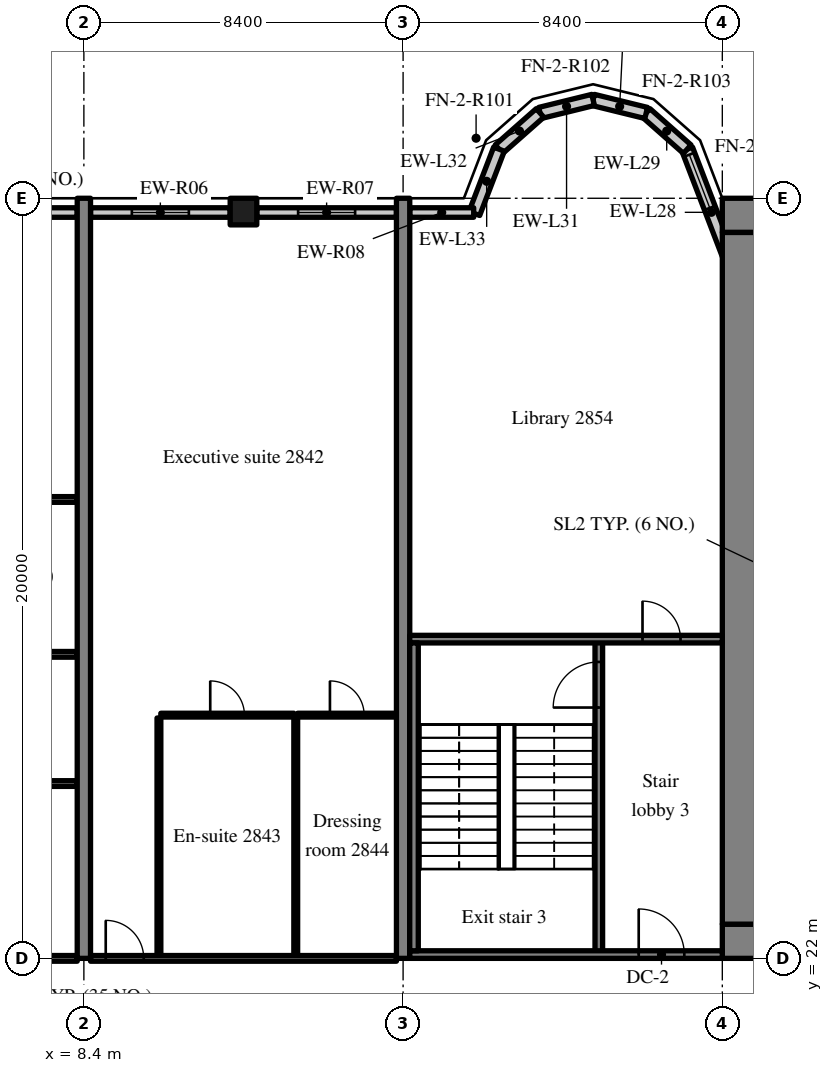
"""IFC4 building model, lengths in metres.
Left out: names, types, materials, properties, quantities, classifications, styles, units other than length and angle.
Written with IfcOpenShell. Run it as: python <this file> out.ifc"""

import sys

from ifc_helpers import new_model, si_unit, direction, frame, frame_2d, origin, origin_2d, place, context, subcontext, project, spatial, rectangle, extrude, source, transform, mapped, element, fill, save


model = new_model("IFC4")
c1 = context("Model", 3, precision=1e-05, world=origin(), true_north=direction((0.0, 1.0)))
c2 = subcontext(c1, "Body", "Model", "MODEL_VIEW")
j1 = project(units=[si_unit("LENGTHUNIT", "METRE"), si_unit("PLANEANGLEUNIT", "RADIAN")], contexts=[c1])
p1 = place(None, origin())
s1 = spatial("IfcSite", under=j1, at=p1, CompositionType="ELEMENT")
p2 = place(p1, origin())
s2 = spatial("IfcBuilding", under=s1, at=p2, CompositionType="ELEMENT")
p3 = place(p2, frame((0.0, 0.0, 118.0)))
s3 = spatial("IfcBuildingStorey", under=s2, at=p3, CompositionType="ELEMENT", Elevation=118.0)
m1 = source(origin(), c2, "Body", "SweptSolid", [
    extrude(rectangle(XDim=50.4, YDim=0.9, at=frame_2d((25.2, 0.0))), origin(), (0.0, 0.0, 1.0), 3.52),
])
p4 = place(p3, frame((25.2, 22.45, 0.0), z_axis=(0.0, 0.0, 1.0), x_axis=(1.0, 0.0, 0.0)))
e1 = element("IfcWall", 1, at=p4, inside=s3, PredefinedType="SHEAR", context=c2, shape_type="MappedRepresentation", body=[
    mapped(m1, transform((0.0, 0.0, 0.0), scale=1.0)),
])
m2 = source(origin(), c2, "Body", "SweptSolid", [
    extrude(rectangle(XDim=1.8, YDim=2.1, at=frame_2d((0.9, 1.05))), frame((0.0, 0.46, 0.0), z_axis=(0.0, -1.0, 0.0), x_axis=(1.0, 0.0, 0.0)), (0.0, 0.0, 1.0), 0.92),
])
p5 = place(p4, frame((15.9, 0.0, 0.0)))
e2 = element("IfcOpeningElement", 2, at=p5, cuts=e1, PredefinedType="OPENING", context=c2, shape_type="MappedRepresentation", body=[
    mapped(m2, transform((0.0, 0.0, 0.0), scale=1.0)),
])
m3 = source(origin(), c2, "Body", "SweptSolid", [
    extrude(rectangle(XDim=1.2, YDim=2.1, at=frame_2d((0.6, 1.05))), frame((0.0, 0.46, 0.0), z_axis=(0.0, -1.0, 0.0), x_axis=(1.0, 0.0, 0.0)), (0.0, 0.0, 1.0), 0.92),
])
p6 = place(p4, frame((26.975, 0.0, 0.0)))
e3 = element("IfcOpeningElement", 3, at=p6, cuts=e1, PredefinedType="OPENING", context=c2, shape_type="MappedRepresentation", body=[
    mapped(m3, transform((0.0, 0.0, 0.0), scale=1.0)),
])
m4 = source(origin(), c2, "Body", "SweptSolid", [
    extrude(rectangle(XDim=0.9, YDim=2.1, at=frame_2d((0.45, 1.05))), frame((0.0, 0.46, 0.0), z_axis=(0.0, -1.0, 0.0), x_axis=(1.0, 0.0, 0.0)), (0.0, 0.0, 1.0), 0.92),
])
p7 = place(p4, frame((33.75, 0.0, 0.0)))
e4 = element("IfcOpeningElement", 4, at=p7, cuts=e1, PredefinedType="OPENING", context=c2, shape_type="MappedRepresentation", body=[
    mapped(m4, transform((0.0, 0.0, 0.0), scale=1.0)),
])
p8 = place(p4, frame((30.75, 0.0, 0.0)))
e5 = element("IfcOpeningElement", 5, at=p8, cuts=e1, PredefinedType="OPENING", context=c2, shape_type="MappedRepresentation", body=[
    mapped(m4, transform((0.0, 0.0, 0.0), scale=1.0)),
])
p9 = place(p4, frame((39.788, 0.0, 0.0)))
e6 = element("IfcOpeningElement", 6, at=p9, cuts=e1, PredefinedType="OPENING", context=c2, shape_type="MappedRepresentation", body=[
    mapped(m4, transform((0.0, 0.0, 0.0), scale=1.0)),
])
p10 = place(p4, frame((36.762, 0.0, 0.0)))
e7 = element("IfcOpeningElement", 7, at=p10, cuts=e1, PredefinedType="OPENING", context=c2, shape_type="MappedRepresentation", body=[
    mapped(m4, transform((0.0, 0.0, 0.0), scale=1.0)),
])
p11 = place(p4, frame((6.45, 0.0, 0.0)))
e8 = element("IfcOpeningElement", 8, at=p11, cuts=e1, PredefinedType="OPENING", context=c2, shape_type="MappedRepresentation", body=[
    mapped(m3, transform((0.0, 0.0, 0.0), scale=1.0)),
])
p12 = place(p4, frame((47.775, 0.0, 0.0)))
e9 = element("IfcOpeningElement", 9, at=p12, cuts=e1, PredefinedType="OPENING", context=c2, shape_type="MappedRepresentation", body=[
    mapped(m3, transform((0.0, 0.0, 0.0), scale=1.0)),
])
p13 = place(p3, frame((25.2, 41.55, 0.0), z_axis=(0.0, 0.0, 1.0), x_axis=(1.0, 0.0, 0.0)))
e10 = element("IfcWall", 10, at=p13, inside=s3, PredefinedType="SHEAR", context=c2, shape_type="MappedRepresentation", body=[
    mapped(m1, transform((0.0, 0.0, 0.0), scale=1.0)),
])
m5 = source(origin(), c2, "Body", "SweptSolid", [
    extrude(rectangle(XDim=18.2, YDim=0.9, at=frame_2d((9.1, 0.0))), origin(), (0.0, 0.0, 1.0), 3.52),
])
p14 = place(p3, frame((25.65, 22.9, 0.0), z_axis=(0.0, 0.0, 1.0), x_axis=(0.0, 1.0, 0.0)))
e11 = element("IfcWall", 11, at=p14, inside=s3, PredefinedType="SHEAR", context=c2, shape_type="MappedRepresentation", body=[
    mapped(m5, transform((0.0, 0.0, 0.0), scale=1.0)),
])
m6 = source(origin(), c2, "Body", "SweptSolid", [
    extrude(rectangle(XDim=20.0, YDim=0.35, at=frame_2d((10.0, 0.0))), origin(), (0.0, 0.0, 1.0), 3.52),
])
for number, where, z_axis, x_axis in (
    (12, (8.4, 22.0, 0.0), (0.0, 0.0, 1.0), (0.0, 1.0, 0.0)),
    (13, (16.8, 22.0, 0.0), (0.0, 0.0, 1.0), (0.0, 1.0, 0.0)),
):
    element("IfcWall", number, at=place(p3, frame(where, z_axis=z_axis, x_axis=x_axis)), inside=s3, PredefinedType="SHEAR", context=c2, shape_type="MappedRepresentation", body=[
        mapped(m6, transform((0.0, 0.0, 0.0), scale=1.0)),
    ])
m7 = source(origin(), c2, "Body", "SweptSolid", [
    extrude(rectangle(XDim=0.7, YDim=0.7, at=origin_2d()), origin(), (0.0, 0.0, 1.0), 3.52),
])
p15 = place(p3, frame((12.6, 41.65, 0.0), z_axis=(0.0, 0.0, 1.0), x_axis=(1.0, 0.0, 0.0)))
e14 = element("IfcColumn", 14, at=p15, inside=s3, PredefinedType="COLUMN", context=c2, shape_type="MappedRepresentation", body=[
    mapped(m7, transform((0.0, 0.0, 0.0), scale=1.0)),
])
m8 = source(origin(), c2, "Body", "SweptSolid", [
    extrude(rectangle(XDim=3.559, YDim=0.3, at=frame_2d((1.78, 0.0))), origin(), (0.0, 0.0, 1.0), 3.52),
])
p16 = place(p3, frame((25.55, 39.969, 0.0), z_axis=(0.0, 0.0, 1.0), x_axis=(-0.35779745313, 0.933799219604, 0.0)))
e15 = element("IfcWall", 15, at=p16, inside=s3, PredefinedType="SOLIDWALL", context=c2, shape_type="MappedRepresentation", body=[
    mapped(m8, transform((0.0, 0.0, 0.0), scale=1.0)),
])
m9 = source(origin(), c2, "Body", "SweptSolid", [
    extrude(rectangle(XDim=1.5, YDim=2.0, at=frame_2d((0.75, 1.0))), frame((0.0, 0.16, 0.0), z_axis=(0.0, -1.0, 0.0), x_axis=(1.0, 0.0, 0.0)), (0.0, 0.0, 1.0), 0.32),
])
p17 = place(p16, frame((1.903, 0.0, 0.9)))
e16 = element("IfcOpeningElement", 16, at=p17, cuts=e15, PredefinedType="OPENING", context=c2, shape_type="MappedRepresentation", body=[
    mapped(m9, transform((0.0, 0.0, 0.0), scale=1.0)),
])
m10 = source(origin(), c2, "Body", "SweptSolid", [
    extrude(rectangle(XDim=1.44, YDim=0.3, at=frame_2d((0.72, 0.0))), origin(), (0.0, 0.0, 1.0), 3.52),
])
p18 = place(p3, frame((24.277, 43.292, 0.0), z_axis=(0.0, 0.0, 1.0), x_axis=(-0.749649827867, 0.661834673902, 0.0)))
e17 = element("IfcWall", 17, at=p18, inside=s3, PredefinedType="SOLIDWALL", context=c2, shape_type="MappedRepresentation", body=[
    mapped(m10, transform((0.0, 0.0, 0.0), scale=1.0)),
])
m11 = source(origin(), c2, "Body", "SweptSolid", [
    extrude(rectangle(XDim=1.438, YDim=0.3, at=frame_2d((0.719, 0.0))), origin(), (0.0, 0.0, 1.0), 3.52),
])
p19 = place(p3, frame((23.197, 44.245, 0.0), z_axis=(0.0, 0.0, 1.0), x_axis=(-0.971152283879, 0.238460146601, 0.0)))
e18 = element("IfcWall", 18, at=p19, inside=s3, PredefinedType="SOLIDWALL", context=c2, shape_type="MappedRepresentation", body=[
    mapped(m11, transform((0.0, 0.0, 0.0), scale=1.0)),
])
m12 = source(origin(), c2, "Body", "SweptSolid", [
    extrude(rectangle(XDim=1.439, YDim=0.3, at=frame_2d((0.719, 0.0))), origin(), (0.0, 0.0, 1.0), 3.52),
])
p20 = place(p3, frame((21.8, 44.588, 0.0), z_axis=(0.0, 0.0, 1.0), x_axis=(-0.971161932466, -0.238420848351, 0.0)))
e19 = element("IfcWall", 19, at=p20, inside=s3, PredefinedType="SOLIDWALL", context=c2, shape_type="MappedRepresentation", body=[
    mapped(m12, transform((0.0, 0.0, 0.0), scale=1.0)),
])
m13 = source(origin(), c2, "Body", "SweptSolid", [
    extrude(rectangle(XDim=1.44, YDim=0.3, at=frame_2d((0.72, 0.0))), origin(), (0.0, 0.0, 1.0), 3.52),
])
p21 = place(p3, frame((20.403, 44.245, 0.0), z_axis=(0.0, 0.0, 1.0), x_axis=(-0.74957555648, -0.661918790432, 0.0)))
e20 = element("IfcWall", 20, at=p21, inside=s3, PredefinedType="SOLIDWALL", context=c2, shape_type="MappedRepresentation", body=[
    mapped(m13, transform((0.0, 0.0, 0.0), scale=1.0)),
])
m14 = source(origin(), c2, "Body", "SweptSolid", [
    extrude(rectangle(XDim=1.812, YDim=0.3, at=frame_2d((0.906, 0.0))), origin(), (0.0, 0.0, 1.0), 3.52),
])
p22 = place(p3, frame((19.323, 43.292, 0.0), z_axis=(0.0, 0.0, 1.0), x_axis=(-0.357877270961, -0.93376863244, 0.0)))
e21 = element("IfcWall", 21, at=p22, inside=s3, PredefinedType="SOLIDWALL", context=c2, shape_type="MappedRepresentation", body=[
    mapped(m14, transform((0.0, 0.0, 0.0), scale=1.0)),
])
m15 = source(origin(), c2, "Body", "SweptSolid", [
    extrude(rectangle(XDim=4.07, YDim=0.25, at=frame_2d((2.035, 0.0))), origin(), (0.0, 0.0, 1.0), 2.82),
])
p23 = place(p3, frame((8.225, 41.625, 0.0), z_axis=(0.0, 0.0, 1.0), x_axis=(-1.0, 0.0, 0.0)))
e22 = element("IfcWall", 22, at=p23, inside=s3, PredefinedType="SOLIDWALL", context=c2, shape_type="MappedRepresentation", body=[
    mapped(m15, transform((0.0, 0.0, 0.0), scale=1.0)),
])
m16 = source(origin(), c2, "Body", "SweptSolid", [
    extrude(rectangle(XDim=1.5, YDim=1.5, at=frame_2d((0.75, 0.75))), frame((0.0, 0.135, 0.0), z_axis=(0.0, -1.0, 0.0), x_axis=(1.0, 0.0, 0.0)), (0.0, 0.0, 1.0), 0.27),
])
p24 = place(p23, frame((1.285, 0.0, 0.9)))
e23 = element("IfcOpeningElement", 23, at=p24, cuts=e22, PredefinedType="OPENING", context=c2, shape_type="MappedRepresentation", body=[
    mapped(m16, transform((0.0, 0.0, 0.0), scale=1.0)),
])
m17 = source(origin(), c2, "Body", "SweptSolid", [
    extrude(rectangle(XDim=3.675, YDim=0.25, at=frame_2d((1.837, 0.0))), origin(), (0.0, 0.0, 1.0), 2.82),
])
p25 = place(p3, frame((12.25, 41.625, 0.0), z_axis=(0.0, 0.0, 1.0), x_axis=(-1.0, 0.0, 0.0)))
e24 = element("IfcWall", 24, at=p25, inside=s3, PredefinedType="SOLIDWALL", context=c2, shape_type="MappedRepresentation", body=[
    mapped(m17, transform((0.0, 0.0, 0.0), scale=1.0)),
])
p26 = place(p25, frame((1.087, 0.0, 0.9)))
e25 = element("IfcOpeningElement", 25, at=p26, cuts=e24, PredefinedType="OPENING", context=c2, shape_type="MappedRepresentation", body=[
    mapped(m16, transform((0.0, 0.0, 0.0), scale=1.0)),
])
p27 = place(p3, frame((16.625, 41.625, 0.0), z_axis=(0.0, 0.0, 1.0), x_axis=(-1.0, 0.0, 0.0)))
e26 = element("IfcWall", 26, at=p27, inside=s3, PredefinedType="SOLIDWALL", context=c2, shape_type="MappedRepresentation", body=[
    mapped(m17, transform((0.0, 0.0, 0.0), scale=1.0)),
])
p28 = place(p27, frame((1.087, 0.0, 0.9)))
e27 = element("IfcOpeningElement", 27, at=p28, cuts=e26, PredefinedType="OPENING", context=c2, shape_type="MappedRepresentation", body=[
    mapped(m16, transform((0.0, 0.0, 0.0), scale=1.0)),
])
m18 = source(origin(), c2, "Body", "SweptSolid", [
    extrude(rectangle(XDim=1.683, YDim=0.25, at=frame_2d((0.841, 0.0))), origin(), (0.0, 0.0, 1.0), 2.82),
])
p29 = place(p3, frame((18.658, 41.625, 0.0), z_axis=(0.0, 0.0, 1.0), x_axis=(-1.0, 0.0, 0.0)))
e28 = element("IfcWall", 28, at=p29, inside=s3, PredefinedType="SOLIDWALL", context=c2, shape_type="MappedRepresentation", body=[
    mapped(m18, transform((0.0, 0.0, 0.0), scale=1.0)),
])
m19 = source(origin(), c2, "Body", "SweptSolid", [
    extrude(rectangle(XDim=8.3, YDim=0.2, at=frame_2d((4.15, 0.0))), origin(), (0.0, 0.0, 1.0), 3.52),
])
p30 = place(p3, frame((21.95, 22.1, 0.0), z_axis=(0.0, 0.0, 1.0), x_axis=(0.0, 1.0, 0.0)))
e29 = element("IfcWall", 29, at=p30, inside=s3, PredefinedType="SOLIDWALL", context=c2, shape_type="MappedRepresentation", body=[
    mapped(m19, transform((0.0, 0.0, 0.0), scale=1.0)),
])
m20 = source(origin(), c2, "Body", "SweptSolid", [
    extrude(rectangle(XDim=1.2, YDim=2.1, at=frame_2d((0.6, 1.05))), frame((0.0, 0.11, 0.0), z_axis=(0.0, -1.0, 0.0), x_axis=(1.0, 0.0, 0.0)), (0.0, 0.0, 1.0), 0.22),
])
p31 = place(p30, frame((6.5, 0.0, 0.0)))
e30 = element("IfcOpeningElement", 30, at=p31, cuts=e29, PredefinedType="OPENING", context=c2, shape_type="MappedRepresentation", body=[
    mapped(m20, transform((0.0, 0.0, 0.0), scale=1.0)),
])
m21 = source(origin(), c2, "Body", "SweptSolid", [
    extrude(rectangle(XDim=8.225, YDim=0.2, at=frame_2d((4.112, 0.0))), origin(), (0.0, 0.0, 1.0), 3.52),
])
p32 = place(p3, frame((16.975, 22.1, 0.0), z_axis=(0.0, 0.0, 1.0), x_axis=(1.0, 0.0, 0.0)))
e31 = element("IfcWall", 31, at=p32, inside=s3, PredefinedType="SOLIDWALL", context=c2, shape_type="MappedRepresentation", body=[
    mapped(m21, transform((0.0, 0.0, 0.0), scale=1.0)),
])
p33 = place(p32, frame((6.025, 0.0, 0.0)))
e32 = element("IfcOpeningElement", 32, at=p33, cuts=e31, PredefinedType="OPENING", context=c2, shape_type="MappedRepresentation", body=[
    mapped(m20, transform((0.0, 0.0, 0.0), scale=1.0)),
])
p34 = place(p3, frame((16.975, 30.4, 0.0), z_axis=(0.0, 0.0, 1.0), x_axis=(1.0, 0.0, 0.0)))
e33 = element("IfcWall", 33, at=p34, inside=s3, PredefinedType="SOLIDWALL", context=c2, shape_type="MappedRepresentation", body=[
    mapped(m21, transform((0.0, 0.0, 0.0), scale=1.0)),
])
m22 = source(origin(), c2, "Body", "SweptSolid", [
    extrude(rectangle(XDim=1.0, YDim=2.1, at=frame_2d((0.5, 1.05))), frame((0.0, 0.11, 0.0), z_axis=(0.0, -1.0, 0.0), x_axis=(1.0, 0.0, 0.0)), (0.0, 0.0, 1.0), 0.22),
])
p35 = place(p34, frame((6.125, 0.0, 0.0)))
e34 = element("IfcOpeningElement", 34, at=p35, cuts=e33, PredefinedType="OPENING", context=c2, shape_type="MappedRepresentation", body=[
    mapped(m22, transform((0.0, 0.0, 0.0), scale=1.0)),
])
m23 = source(origin(), c2, "Body", "SweptSolid", [
    extrude(rectangle(XDim=8.1, YDim=0.225, at=frame_2d((4.05, 0.0))), origin(), (0.0, 0.0, 1.0), 3.52),
])
p36 = place(p3, frame((17.087, 22.2, 0.0), z_axis=(0.0, 0.0, 1.0), x_axis=(0.0, 1.0, 0.0)))
e35 = element("IfcWall", 35, at=p36, inside=s3, PredefinedType="SOLIDWALL", context=c2, shape_type="MappedRepresentation", body=[
    mapped(m23, transform((0.0, 0.0, 0.0), scale=1.0)),
])
m24 = source(origin(), c2, "Body", "SweptSolid", [
    extrude(rectangle(XDim=5.325, YDim=0.15, at=frame_2d((2.663, 0.0))), origin(), (0.0, 0.0, 1.0), 2.82),
])
p37 = place(p3, frame((2.9, 22.0, 0.0), z_axis=(0.0, 0.0, 1.0), x_axis=(1.0, 0.0, 0.0)))
e36 = element("IfcWall", 36, at=p37, inside=s3, PredefinedType="PARTITIONING", context=c2, shape_type="MappedRepresentation", body=[
    mapped(m24, transform((0.0, 0.0, 0.0), scale=1.0)),
])
m25 = source(origin(), c2, "Body", "SweptSolid", [
    extrude(rectangle(XDim=5.325, YDim=0.15, at=frame_2d((2.663, 0.0))), origin(), (0.0, 0.0, 1.0), 3.52),
])
for number, where, z_axis, x_axis in (
    (37, (2.9, 26.6, 0.0), (0.0, 0.0, 1.0), (1.0, 0.0, 0.0)),
    (38, (2.9, 30.0, 0.0), (0.0, 0.0, 1.0), (1.0, 0.0, 0.0)),
):
    element("IfcWall", number, at=place(p3, frame(where, z_axis=z_axis, x_axis=x_axis)), inside=s3, PredefinedType="PARTITIONING", context=c2, shape_type="MappedRepresentation", body=[
        mapped(m25, transform((0.0, 0.0, 0.0), scale=1.0)),
    ])
m26 = source(origin(), c2, "Body", "SweptSolid", [
    extrude(rectangle(XDim=7.875, YDim=0.15, at=frame_2d((3.938, 0.0))), origin(), (0.0, 0.0, 1.0), 3.52),
])
p38 = place(p3, frame((0.35, 34.075, 0.0), z_axis=(0.0, 0.0, 1.0), x_axis=(1.0, 0.0, 0.0)))
e39 = element("IfcWall", 39, at=p38, inside=s3, PredefinedType="PARTITIONING", context=c2, shape_type="MappedRepresentation", body=[
    mapped(m26, transform((0.0, 0.0, 0.0), scale=1.0)),
])
m27 = source(origin(), c2, "Body", "SweptSolid", [
    extrude(rectangle(XDim=1.0, YDim=2.1, at=frame_2d((0.5, 1.05))), frame((0.0, 0.085, 0.0), z_axis=(0.0, -1.0, 0.0), x_axis=(1.0, 0.0, 0.0)), (0.0, 0.0, 1.0), 0.17),
])
p39 = place(p38, frame((0.7, 0.0, 0.0)))
e40 = element("IfcOpeningElement", 40, at=p39, cuts=e39, PredefinedType="OPENING", context=c2, shape_type="MappedRepresentation", body=[
    mapped(m27, transform((0.0, 0.0, 0.0), scale=1.0)),
])
m28 = source(origin(), c2, "Body", "SweptSolid", [
    extrude(rectangle(XDim=6.25, YDim=0.1, at=frame_2d((3.125, 0.0))), origin(), (0.0, 0.0, 1.0), 3.52),
])
for number, where, z_axis, x_axis in (
    (41, (10.375, 22.075, 0.0), (0.0, 0.0, 1.0), (0.0, 1.0, 0.0)),
    (42, (13.975, 22.075, 0.0), (0.0, 0.0, 1.0), (0.0, 1.0, 0.0)),
):
    element("IfcWall", number, at=place(p3, frame(where, z_axis=z_axis, x_axis=x_axis)), inside=s3, PredefinedType="PARTITIONING", context=c2, shape_type="MappedRepresentation", body=[
        mapped(m28, transform((0.0, 0.0, 0.0), scale=1.0)),
    ])
m29 = source(origin(), c2, "Body", "SweptSolid", [
    extrude(rectangle(XDim=3.5, YDim=0.1, at=frame_2d((1.75, 0.0))), origin(), (0.0, 0.0, 1.0), 3.52),
])
p40 = place(p3, frame((10.425, 28.4, 0.0), z_axis=(0.0, 0.0, 1.0), x_axis=(1.0, 0.0, 0.0)))
e43 = element("IfcWall", 43, at=p40, inside=s3, PredefinedType="PARTITIONING", context=c2, shape_type="MappedRepresentation", body=[
    mapped(m29, transform((0.0, 0.0, 0.0), scale=1.0)),
])
m30 = source(origin(), c2, "Body", "SweptSolid", [
    extrude(rectangle(XDim=0.9, YDim=2.1, at=frame_2d((0.45, 1.05))), frame((0.0, 0.06, 0.0), z_axis=(0.0, -1.0, 0.0), x_axis=(1.0, 0.0, 0.0)), (0.0, 0.0, 1.0), 0.12),
])
p41 = place(p40, frame((1.3, 0.0, 0.0)))
e44 = element("IfcOpeningElement", 44, at=p41, cuts=e43, PredefinedType="OPENING", context=c2, shape_type="MappedRepresentation", body=[
    mapped(m30, transform((0.0, 0.0, 0.0), scale=1.0)),
])
m31 = source(origin(), c2, "Body", "SweptSolid", [
    extrude(rectangle(XDim=2.6, YDim=0.1, at=frame_2d((1.3, 0.0))), origin(), (0.0, 0.0, 1.0), 3.52),
])
p42 = place(p3, frame((14.025, 28.4, 0.0), z_axis=(0.0, 0.0, 1.0), x_axis=(1.0, 0.0, 0.0)))
e45 = element("IfcWall", 45, at=p42, inside=s3, PredefinedType="PARTITIONING", context=c2, shape_type="MappedRepresentation", body=[
    mapped(m31, transform((0.0, 0.0, 0.0), scale=1.0)),
])
p43 = place(p42, frame((0.85, 0.0, 0.0)))
e46 = element("IfcOpeningElement", 46, at=p43, cuts=e45, PredefinedType="OPENING", context=c2, shape_type="MappedRepresentation", body=[
    mapped(m30, transform((0.0, 0.0, 0.0), scale=1.0)),
])
m32 = source(origin(), c2, "Body", "SweptSolid", [
    extrude(rectangle(XDim=8.05, YDim=0.15, at=frame_2d((4.025, 0.0))), origin(), (0.0, 0.0, 1.0), 2.82),
])
p44 = place(p3, frame((8.575, 22.0, 0.0), z_axis=(0.0, 0.0, 1.0), x_axis=(1.0, 0.0, 0.0)))
e47 = element("IfcWall", 47, at=p44, inside=s3, PredefinedType="PARTITIONING", context=c2, shape_type="MappedRepresentation", body=[
    mapped(m32, transform((0.0, 0.0, 0.0), scale=1.0)),
])
p45 = place(p44, frame((0.4, 0.0, 0.0)))
e48 = element("IfcOpeningElement", 48, at=p45, cuts=e47, PredefinedType="OPENING", context=c2, shape_type="MappedRepresentation", body=[
    mapped(m27, transform((0.0, 0.0, 0.0), scale=1.0)),
])
m33 = source(origin(), c2, "Body", "SweptSolid", [
    extrude(rectangle(XDim=1.5, YDim=2.0, at=frame_2d((0.75, 1.0))), frame((0.0, 0.03, 0.0), z_axis=(0.0, -1.0, 0.0), x_axis=(1.0, 0.0, 0.0)), (0.0, 0.0, 1.0), 0.06),
])
p46 = place(p17, origin())
e49 = element("IfcWindow", 49, at=p46, inside=s3, PartitioningType="SINGLE_PANEL", PredefinedType="WINDOW", context=c2, shape_type="MappedRepresentation", body=[
    mapped(m33, transform((0.0, 0.0, 0.0), scale=1.0)),
])
fill(e16, e49)
m34 = source(origin(), c2, "Body", "SweptSolid", [
    extrude(rectangle(XDim=1.5, YDim=1.5, at=frame_2d((0.75, 0.75))), frame((0.0, 0.03, 0.0), z_axis=(0.0, -1.0, 0.0), x_axis=(1.0, 0.0, 0.0)), (0.0, 0.0, 1.0), 0.06),
])
p47 = place(p26, origin())
e50 = element("IfcWindow", 50, at=p47, inside=s3, PartitioningType="SINGLE_PANEL", PredefinedType="WINDOW", context=c2, shape_type="MappedRepresentation", body=[
    mapped(m34, transform((0.0, 0.0, 0.0), scale=1.0)),
])
fill(e25, e50)
p48 = place(p28, origin())
e51 = element("IfcWindow", 51, at=p48, inside=s3, PartitioningType="SINGLE_PANEL", PredefinedType="WINDOW", context=c2, shape_type="MappedRepresentation", body=[
    mapped(m34, transform((0.0, 0.0, 0.0), scale=1.0)),
])
fill(e27, e51)
m35 = source(origin(), c2, "Body", "SweptSolid", [
    extrude(rectangle(XDim=1.2, YDim=2.1, at=frame_2d((0.6, 1.05))), frame((0.0, 0.025, 0.0), z_axis=(0.0, -1.0, 0.0), x_axis=(1.0, 0.0, 0.0)), (0.0, 0.0, 1.0), 0.05),
])
p49 = place(p31, origin())
e52 = element("IfcDoor", 52, at=p49, inside=s3, OperationType="SINGLE_SWING_LEFT", PredefinedType="DOOR", context=c2, shape_type="MappedRepresentation", body=[
    mapped(m35, transform((0.0, 0.0, 0.0), scale=1.0)),
])
fill(e30, e52)
p50 = place(p33, origin())
e53 = element("IfcDoor", 53, at=p50, inside=s3, OperationType="SINGLE_SWING_LEFT", PredefinedType="DOOR", context=c2, shape_type="MappedRepresentation", body=[
    mapped(m35, transform((0.0, 0.0, 0.0), scale=1.0)),
])
fill(e32, e53)
m36 = source(origin(), c2, "Body", "SweptSolid", [
    extrude(rectangle(XDim=1.0, YDim=2.1, at=frame_2d((0.5, 1.05))), frame((0.0, 0.025, 0.0), z_axis=(0.0, -1.0, 0.0), x_axis=(1.0, 0.0, 0.0)), (0.0, 0.0, 1.0), 0.05),
])
p51 = place(p35, origin())
e54 = element("IfcDoor", 54, at=p51, inside=s3, OperationType="SINGLE_SWING_LEFT", PredefinedType="DOOR", context=c2, shape_type="MappedRepresentation", body=[
    mapped(m36, transform((0.0, 0.0, 0.0), scale=1.0)),
])
fill(e34, e54)
m37 = source(origin(), c2, "Body", "SweptSolid", [
    extrude(rectangle(XDim=0.9, YDim=2.1, at=frame_2d((0.45, 1.05))), frame((0.0, 0.025, 0.0), z_axis=(0.0, -1.0, 0.0), x_axis=(1.0, 0.0, 0.0)), (0.0, 0.0, 1.0), 0.05),
])
p52 = place(p41, origin())
e55 = element("IfcDoor", 55, at=p52, inside=s3, OperationType="SINGLE_SWING_LEFT", PredefinedType="DOOR", context=c2, shape_type="MappedRepresentation", body=[
    mapped(m37, transform((0.0, 0.0, 0.0), scale=1.0)),
])
fill(e44, e55)
p53 = place(p43, origin())
e56 = element("IfcDoor", 56, at=p53, inside=s3, OperationType="SINGLE_SWING_LEFT", PredefinedType="DOOR", context=c2, shape_type="MappedRepresentation", body=[
    mapped(m37, transform((0.0, 0.0, 0.0), scale=1.0)),
])
fill(e46, e56)
p54 = place(p45, origin())
e57 = element("IfcDoor", 57, at=p54, inside=s3, OperationType="SINGLE_SWING_LEFT", PredefinedType="DOOR", context=c2, shape_type="MappedRepresentation", body=[
    mapped(m36, transform((0.0, 0.0, 0.0), scale=1.0)),
])
fill(e48, e57)
save(model, sys.argv[1])
